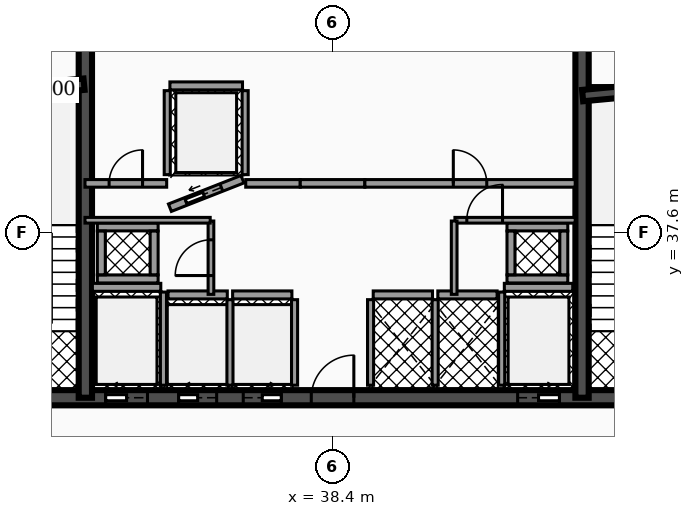
"""IFC4 building model, lengths in metres.
Left out: names, types, materials, properties, quantities, classifications, styles, units other than length and angle.
Written with IfcOpenShell. Run it as: python <this file> out.ifc"""

import sys

from ifc_helpers import new_model, si_unit, direction, frame, frame_2d, origin, place, context, subcontext, project, spatial, rectangle, extrude, element, fill, save


model = new_model("IFC4")
c1 = context("Model", 3, precision=1e-05, world=origin(), true_north=direction((0.0, 1.0)))
c2 = subcontext(c1, "Body", "Model", "MODEL_VIEW")
j1 = project(units=[si_unit("LENGTHUNIT", "METRE"), si_unit("PLANEANGLEUNIT", "RADIAN")], contexts=[c1])
p1 = place(None, origin())
s1 = spatial("IfcSite", under=j1, at=p1, CompositionType="ELEMENT")
p2 = place(p1, origin())
s2 = spatial("IfcBuilding", under=s1, at=p2, CompositionType="ELEMENT")
p3 = place(p2, frame((0.0, 0.0, 149.6)))
s3 = spatial("IfcBuildingStorey", under=s2, at=p3, CompositionType="ELEMENT", Elevation=149.6)
p4 = place(p3, frame((28.4, 33.25, 0.0), z_axis=(0.0, 0.0, 1.0), x_axis=(1.0, 0.0, 0.0)))
e1 = element("IfcWall", 1, at=p4, inside=s3, PredefinedType="SHEAR", context=c2, shape_type="SweptSolid", body=[
    extrude(rectangle(XDim=20.06, YDim=0.4, at=frame_2d((10.03, 0.0))), origin(), (0.0, 0.0, 1.0), 3.5),
])
p5 = place(p4, frame((4.03, 0.0, 0.0)))
e2 = element("IfcOpeningElement", 2, at=p5, cuts=e1, PredefinedType="OPENING", context=c2, shape_type="SweptSolid", body=[
    extrude(rectangle(XDim=1.1, YDim=2.15, at=frame_2d((0.55, 1.075))), frame((0.0, 0.21, 0.0), z_axis=(0.0, -1.0, 0.0), x_axis=(1.0, 0.0, 0.0)), (0.0, 0.0, 1.0), 0.42),
])
p6 = place(p4, frame((14.87, 0.0, 0.0)))
e3 = element("IfcOpeningElement", 3, at=p6, cuts=e1, PredefinedType="OPENING", context=c2, shape_type="SweptSolid", body=[
    extrude(rectangle(XDim=1.1, YDim=2.15, at=frame_2d((0.55, 1.075))), frame((0.0, 0.21, 0.0), z_axis=(0.0, -1.0, 0.0), x_axis=(1.0, 0.0, 0.0)), (0.0, 0.0, 1.0), 0.42),
])
p7 = place(p4, frame((5.95, 0.0, 0.0)))
e4 = element("IfcOpeningElement", 4, at=p7, cuts=e1, PredefinedType="OPENING", context=c2, shape_type="SweptSolid", body=[
    extrude(rectangle(XDim=1.0, YDim=2.1, at=frame_2d((0.5, 1.05))), frame((0.0, 0.21, 0.0), z_axis=(0.0, -1.0, 0.0), x_axis=(1.0, 0.0, 0.0)), (0.0, 0.0, 1.0), 0.42),
])
p8 = place(p4, frame((7.65, 0.0, 0.0)))
e5 = element("IfcOpeningElement", 5, at=p8, cuts=e1, PredefinedType="OPENING", context=c2, shape_type="SweptSolid", body=[
    extrude(rectangle(XDim=1.0, YDim=2.1, at=frame_2d((0.5, 1.05))), frame((0.0, 0.21, 0.0), z_axis=(0.0, -1.0, 0.0), x_axis=(1.0, 0.0, 0.0)), (0.0, 0.0, 1.0), 0.42),
])
p9 = place(p4, frame((1.31, 0.0, 0.0)))
e6 = element("IfcOpeningElement", 6, at=p9, cuts=e1, PredefinedType="OPENING", context=c2, shape_type="SweptSolid", body=[
    extrude(rectangle(XDim=1.1, YDim=2.2, at=frame_2d((0.55, 1.1))), frame((0.0, 0.21, 0.0), z_axis=(0.0, -1.0, 0.0), x_axis=(1.0, 0.0, 0.0)), (0.0, 0.0, 1.0), 0.42),
])
p10 = place(p4, frame((9.44, 0.0, 0.0)))
e7 = element("IfcOpeningElement", 7, at=p10, cuts=e1, PredefinedType="OPENING", context=c2, shape_type="SweptSolid", body=[
    extrude(rectangle(XDim=1.12, YDim=2.05, at=frame_2d((0.56, 1.025))), frame((0.0, 0.21, 0.0), z_axis=(0.0, -1.0, 0.0), x_axis=(1.0, 0.0, 0.0)), (0.0, 0.0, 1.0), 0.42),
])
p11 = place(p4, frame((17.65, 0.0, 0.0)))
e8 = element("IfcOpeningElement", 8, at=p11, cuts=e1, PredefinedType="OPENING", context=c2, shape_type="SweptSolid", body=[
    extrude(rectangle(XDim=1.1, YDim=2.2, at=frame_2d((0.55, 1.1))), frame((0.0, 0.21, 0.0), z_axis=(0.0, -1.0, 0.0), x_axis=(1.0, 0.0, 0.0)), (0.0, 0.0, 1.0), 0.42),
])
for number, where, z_axis, x_axis in (
    (9, (31.895, 33.25, 0.0), (0.0, 0.0, 1.0), (0.0, 1.0, 0.0)),
    (10, (44.965, 33.25, 0.0), (0.0, 0.0, 1.0), (0.0, 1.0, 0.0)),
):
    element("IfcWall", number, at=place(p3, frame(where, z_axis=z_axis, x_axis=x_axis)), inside=s3, PredefinedType="SHEAR", context=c2, shape_type="SweptSolid", body=[
        extrude(rectangle(XDim=10.2, YDim=0.35, at=frame_2d((5.1, 0.0))), origin(), (0.0, 0.0, 1.0), 3.5),
    ])
p12 = place(p3, frame((28.64, 41.2, 0.0), z_axis=(0.0, 0.0, 1.0), x_axis=(0.995687118776, 0.092774789157, 0.0)))
e11 = element("IfcWall", 11, at=p12, inside=s3, PredefinedType="SHEAR", context=c2, shape_type="SweptSolid", body=[
    extrude(rectangle(XDim=3.234, YDim=0.3, at=frame_2d((1.617, 0.0))), origin(), (0.0, 0.0, 1.0), 3.5),
])
p13 = place(p3, frame((44.98, 41.2, 0.0), z_axis=(0.0, 0.0, 1.0), x_axis=(0.995686468965, 0.09278176286, 0.0)))
e12 = element("IfcWall", 12, at=p13, inside=s3, PredefinedType="SHEAR", context=c2, shape_type="SweptSolid", body=[
    extrude(rectangle(XDim=3.234, YDim=0.3, at=frame_2d((1.617, 0.0))), origin(), (0.0, 0.0, 1.0), 3.5),
])
p14 = place(p3, frame((32.08, 36.155, 0.0), z_axis=(0.0, 0.0, 1.0), x_axis=(1.0, 0.0, 0.0)))
e13 = element("IfcWall", 13, at=p14, inside=s3, PredefinedType="SOLIDWALL", context=c2, shape_type="SweptSolid", body=[
    extrude(rectangle(XDim=1.8, YDim=0.21, at=frame_2d((0.9, 0.0))), origin(), (0.0, 0.0, 1.0), 2.472),
])
p15 = place(p3, frame((33.95, 33.58, 0.0), z_axis=(0.0, 0.0, 1.0), x_axis=(0.0, 1.0, 0.0)))
e14 = element("IfcWall", 14, at=p15, inside=s3, PredefinedType="SOLIDWALL", context=c2, shape_type="SweptSolid", body=[
    extrude(rectangle(XDim=2.45, YDim=0.16, at=frame_2d((1.225, 0.0))), origin(), (0.0, 0.0, 1.0), 2.472),
])
p16 = place(p3, frame((42.92, 36.155, 0.0), z_axis=(0.0, 0.0, 1.0), x_axis=(1.0, 0.0, 0.0)))
e15 = element("IfcWall", 15, at=p16, inside=s3, PredefinedType="SOLIDWALL", context=c2, shape_type="SweptSolid", body=[
    extrude(rectangle(XDim=1.8, YDim=0.21, at=frame_2d((0.9, 0.0))), origin(), (0.0, 0.0, 1.0), 2.472),
])
p17 = place(p3, frame((42.85, 33.58, 0.0), z_axis=(0.0, 0.0, 1.0), x_axis=(0.0, 1.0, 0.0)))
e16 = element("IfcWall", 16, at=p17, inside=s3, PredefinedType="SOLIDWALL", context=c2, shape_type="SweptSolid", body=[
    extrude(rectangle(XDim=2.45, YDim=0.16, at=frame_2d((1.225, 0.0))), origin(), (0.0, 0.0, 1.0), 2.472),
])
p18 = place(p3, frame((34.07, 35.955, 0.0), z_axis=(0.0, 0.0, 1.0), x_axis=(1.0, 0.0, 0.0)))
e17 = element("IfcWall", 17, at=p18, inside=s3, PredefinedType="SOLIDWALL", context=c2, shape_type="SweptSolid", body=[
    extrude(rectangle(XDim=1.56, YDim=0.21, at=frame_2d((0.78, 0.0))), origin(), (0.0, 0.0, 1.0), 2.472),
])
p19 = place(p3, frame((35.7, 33.58, 0.0), z_axis=(0.0, 0.0, 1.0), x_axis=(0.0, 1.0, 0.0)))
e18 = element("IfcWall", 18, at=p19, inside=s3, PredefinedType="SOLIDWALL", context=c2, shape_type="SweptSolid", body=[
    extrude(rectangle(XDim=2.25, YDim=0.16, at=frame_2d((1.125, 0.0))), origin(), (0.0, 0.0, 1.0), 2.472),
])
p20 = place(p3, frame((35.77, 35.955, 0.0), z_axis=(0.0, 0.0, 1.0), x_axis=(1.0, 0.0, 0.0)))
e19 = element("IfcWall", 19, at=p20, inside=s3, PredefinedType="SOLIDWALL", context=c2, shape_type="SweptSolid", body=[
    extrude(rectangle(XDim=1.56, YDim=0.21, at=frame_2d((0.78, 0.0))), origin(), (0.0, 0.0, 1.0), 2.472),
])
p21 = place(p3, frame((37.4, 33.58, 0.0), z_axis=(0.0, 0.0, 1.0), x_axis=(0.0, 1.0, 0.0)))
e20 = element("IfcWall", 20, at=p21, inside=s3, PredefinedType="SOLIDWALL", context=c2, shape_type="SweptSolid", body=[
    extrude(rectangle(XDim=2.25, YDim=0.16, at=frame_2d((1.125, 0.0))), origin(), (0.0, 0.0, 1.0), 2.472),
])
p22 = place(p3, frame((34.12, 38.25, 0.0), z_axis=(0.0, 0.0, 1.0), x_axis=(0.930804993012, 0.36551616241, 0.0)))
e21 = element("IfcWall", 21, at=p22, inside=s3, PredefinedType="SOLIDWALL", context=c2, shape_type="SweptSolid", body=[
    extrude(rectangle(XDim=2.052, YDim=0.21, at=frame_2d((1.026, 0.0))), origin(), (0.0, 0.0, 1.0), 2.472),
])
p23 = place(p22, frame((0.455, 0.0, 0.0)))
e22 = element("IfcOpeningElement", 22, at=p23, cuts=e21, PredefinedType="OPENING", context=c2, shape_type="SweptSolid", body=[
    extrude(rectangle(XDim=1.0, YDim=2.1, at=frame_2d((0.5, 1.05))), frame((0.0, 0.115, 0.0), z_axis=(0.0, -1.0, 0.0), x_axis=(1.0, 0.0, 0.0)), (0.0, 0.0, 1.0), 0.23),
])
p24 = place(p3, frame((34.12, 41.455, 0.0), z_axis=(0.0, 0.0, 1.0), x_axis=(1.0, 0.0, 0.0)))
e23 = element("IfcWall", 23, at=p24, inside=s3, PredefinedType="SOLIDWALL", context=c2, shape_type="SweptSolid", body=[
    extrude(rectangle(XDim=1.91, YDim=0.21, at=frame_2d((0.955, 0.0))), origin(), (0.0, 0.0, 1.0), 2.472),
])
for number, where, z_axis, x_axis in (
    (24, (34.05, 39.12, 0.0), (0.0, 0.0, 1.0), (0.0, 1.0, 0.0)),
    (25, (36.1, 39.12, 0.0), (0.0, 0.0, 1.0), (0.0, 1.0, 0.0)),
):
    element("IfcWall", number, at=place(p3, frame(where, z_axis=z_axis, x_axis=x_axis)), inside=s3, PredefinedType="SOLIDWALL", context=c2, shape_type="SweptSolid", body=[
        extrude(rectangle(XDim=2.21, YDim=0.16, at=frame_2d((1.105, 0.0))), origin(), (0.0, 0.0, 1.0), 2.472),
    ])
p25 = place(p3, frame((39.47, 35.955, 0.0), z_axis=(0.0, 0.0, 1.0), x_axis=(1.0, 0.0, 0.0)))
e26 = element("IfcWall", 26, at=p25, inside=s3, PredefinedType="SOLIDWALL", context=c2, shape_type="SweptSolid", body=[
    extrude(rectangle(XDim=1.56, YDim=0.21, at=frame_2d((0.78, 0.0))), origin(), (0.0, 0.0, 1.0), 2.472),
])
for number, where, z_axis, x_axis in (
    (27, (39.4, 33.58, 0.0), (0.0, 0.0, 1.0), (0.0, 1.0, 0.0)),
    (28, (41.1, 33.58, 0.0), (0.0, 0.0, 1.0), (0.0, 1.0, 0.0)),
):
    element("IfcWall", number, at=place(p3, frame(where, z_axis=z_axis, x_axis=x_axis)), inside=s3, PredefinedType="SOLIDWALL", context=c2, shape_type="SweptSolid", body=[
        extrude(rectangle(XDim=2.25, YDim=0.16, at=frame_2d((1.125, 0.0))), origin(), (0.0, 0.0, 1.0), 2.472),
    ])
p26 = place(p3, frame((41.17, 35.955, 0.0), z_axis=(0.0, 0.0, 1.0), x_axis=(1.0, 0.0, 0.0)))
e29 = element("IfcWall", 29, at=p26, inside=s3, PredefinedType="SOLIDWALL", context=c2, shape_type="SweptSolid", body=[
    extrude(rectangle(XDim=1.56, YDim=0.21, at=frame_2d((0.78, 0.0))), origin(), (0.0, 0.0, 1.0), 2.472),
])
for number, where, z_axis, x_axis in (
    (30, (32.21, 36.375, 0.0), (0.0, 0.0, 1.0), (1.0, 0.0, 0.0)),
    (31, (32.21, 37.745, 0.0), (0.0, 0.0, 1.0), (1.0, 0.0, 0.0)),
):
    element("IfcWall", number, at=place(p3, frame(where, z_axis=z_axis, x_axis=x_axis)), inside=s3, PredefinedType="SOLIDWALL", context=c2, shape_type="SweptSolid", body=[
        extrude(rectangle(XDim=1.6, YDim=0.21, at=frame_2d((0.8, 0.0))), origin(), (0.0, 0.0, 1.0), 3.5),
    ])
for number, where, z_axis, x_axis in (
    (32, (32.315, 36.485, 0.0), (0.0, 0.0, 1.0), (0.0, 1.0, 0.0)),
    (33, (33.705, 36.485, 0.0), (0.0, 0.0, 1.0), (0.0, 1.0, 0.0)),
):
    element("IfcWall", number, at=place(p3, frame(where, z_axis=z_axis, x_axis=x_axis)), inside=s3, PredefinedType="SOLIDWALL", context=c2, shape_type="SweptSolid", body=[
        extrude(rectangle(XDim=1.15, YDim=0.21, at=frame_2d((0.575, 0.0))), origin(), (0.0, 0.0, 1.0), 3.5),
    ])
for number, where, z_axis, x_axis in (
    (34, (42.99, 36.375, 0.0), (0.0, 0.0, 1.0), (1.0, 0.0, 0.0)),
    (35, (42.99, 37.745, 0.0), (0.0, 0.0, 1.0), (1.0, 0.0, 0.0)),
):
    element("IfcWall", number, at=place(p3, frame(where, z_axis=z_axis, x_axis=x_axis)), inside=s3, PredefinedType="SOLIDWALL", context=c2, shape_type="SweptSolid", body=[
        extrude(rectangle(XDim=1.6, YDim=0.21, at=frame_2d((0.8, 0.0))), origin(), (0.0, 0.0, 1.0), 3.5),
    ])
for number, where, z_axis, x_axis in (
    (36, (43.095, 36.485, 0.0), (0.0, 0.0, 1.0), (0.0, 1.0, 0.0)),
    (37, (44.485, 36.485, 0.0), (0.0, 0.0, 1.0), (0.0, 1.0, 0.0)),
):
    element("IfcWall", number, at=place(p3, frame(where, z_axis=z_axis, x_axis=x_axis)), inside=s3, PredefinedType="SOLIDWALL", context=c2, shape_type="SweptSolid", body=[
        extrude(rectangle(XDim=1.15, YDim=0.21, at=frame_2d((0.575, 0.0))), origin(), (0.0, 0.0, 1.0), 3.5),
    ])
p27 = place(p3, frame((35.2, 35.97, 0.0), z_axis=(0.0, 0.0, 1.0), x_axis=(0.0, 1.0, 0.0)))
e38 = element("IfcWall", 38, at=p27, inside=s3, PredefinedType="PARTITIONING", context=c2, shape_type="SweptSolid", body=[
    extrude(rectangle(XDim=1.93, YDim=0.15, at=frame_2d((0.965, 0.0))), origin(), (0.0, 0.0, 1.0), 2.457),
])
p28 = place(p27, frame((0.495, 0.0, 0.0)))
e39 = element("IfcOpeningElement", 39, at=p28, cuts=e38, PredefinedType="OPENING", context=c2, shape_type="SweptSolid", body=[
    extrude(rectangle(XDim=0.94, YDim=2.05, at=frame_2d((0.47, 1.025))), frame((0.0, 0.085, 0.0), z_axis=(0.0, -1.0, 0.0), x_axis=(1.0, 0.0, 0.0)), (0.0, 0.0, 1.0), 0.17),
])
p29 = place(p3, frame((31.885, 37.92, 0.0), z_axis=(0.0, 0.0, 1.0), x_axis=(1.0, 0.0, 0.0)))
e40 = element("IfcWall", 40, at=p29, inside=s3, PredefinedType="PARTITIONING", context=c2, shape_type="SweptSolid", body=[
    extrude(rectangle(XDim=3.295, YDim=0.15, at=frame_2d((1.647, 0.0))), origin(), (0.0, 0.0, 1.0), 2.457),
])
p30 = place(p3, frame((31.885, 38.89, 0.0), z_axis=(0.0, 0.0, 1.0), x_axis=(1.0, 0.0, 0.0)))
e41 = element("IfcWall", 41, at=p30, inside=s3, PredefinedType="PARTITIONING", context=c2, shape_type="SweptSolid", body=[
    extrude(rectangle(XDim=2.15, YDim=0.2, at=frame_2d((1.075, 0.0))), origin(), (0.0, 0.0, 1.0), 2.457),
])
p31 = place(p30, frame((0.635, 0.0, 0.0)))
e42 = element("IfcOpeningElement", 42, at=p31, cuts=e41, PredefinedType="OPENING", context=c2, shape_type="SweptSolid", body=[
    extrude(rectangle(XDim=0.88, YDim=2.05, at=frame_2d((0.44, 1.025))), frame((0.0, 0.11, 0.0), z_axis=(0.0, -1.0, 0.0), x_axis=(1.0, 0.0, 0.0)), (0.0, 0.0, 1.0), 0.22),
])
p32 = place(p3, frame((36.115, 38.89, 0.0), z_axis=(0.0, 0.0, 1.0), x_axis=(1.0, 0.0, 0.0)))
e43 = element("IfcWall", 43, at=p32, inside=s3, PredefinedType="PARTITIONING", context=c2, shape_type="SweptSolid", body=[
    extrude(rectangle(XDim=1.435, YDim=0.2, at=frame_2d((0.718, 0.0))), origin(), (0.0, 0.0, 1.0), 2.457),
])
p33 = place(p3, frame((37.55, 38.89, 0.0), z_axis=(0.0, 0.0, 1.0), x_axis=(1.0, 0.0, 0.0)))
e44 = element("IfcWall", 44, at=p33, inside=s3, PredefinedType="PARTITIONING", context=c2, shape_type="SweptSolid", body=[
    extrude(rectangle(XDim=1.7, YDim=0.2, at=frame_2d((0.85, 0.0))), origin(), (0.0, 0.0, 1.0), 2.457),
])
p34 = place(p3, frame((39.25, 38.89, 0.0), z_axis=(0.0, 0.0, 1.0), x_axis=(1.0, 0.0, 0.0)))
e45 = element("IfcWall", 45, at=p34, inside=s3, PredefinedType="PARTITIONING", context=c2, shape_type="SweptSolid", body=[
    extrude(rectangle(XDim=5.535, YDim=0.2, at=frame_2d((2.768, 0.0))), origin(), (0.0, 0.0, 1.0), 2.457),
])
p35 = place(p34, frame((2.327, 0.0, 0.0)))
e46 = element("IfcOpeningElement", 46, at=p35, cuts=e45, PredefinedType="OPENING", context=c2, shape_type="SweptSolid", body=[
    extrude(rectangle(XDim=0.88, YDim=2.05, at=frame_2d((0.44, 1.025))), frame((0.0, 0.11, 0.0), z_axis=(0.0, -1.0, 0.0), x_axis=(1.0, 0.0, 0.0)), (0.0, 0.0, 1.0), 0.22),
])
p36 = place(p3, frame((41.62, 37.92, 0.0), z_axis=(0.0, 0.0, 1.0), x_axis=(1.0, 0.0, 0.0)))
e47 = element("IfcWall", 47, at=p36, inside=s3, PredefinedType="PARTITIONING", context=c2, shape_type="SweptSolid", body=[
    extrude(rectangle(XDim=3.165, YDim=0.15, at=frame_2d((1.583, 0.0))), origin(), (0.0, 0.0, 1.0), 2.457),
])
p37 = place(p36, frame((0.312, 0.0, 0.0)))
e48 = element("IfcOpeningElement", 48, at=p37, cuts=e47, PredefinedType="OPENING", context=c2, shape_type="SweptSolid", body=[
    extrude(rectangle(XDim=0.94, YDim=2.05, at=frame_2d((0.47, 1.025))), frame((0.0, 0.085, 0.0), z_axis=(0.0, -1.0, 0.0), x_axis=(1.0, 0.0, 0.0)), (0.0, 0.0, 1.0), 0.17),
])
p38 = place(p3, frame((41.6, 35.97, 0.0), z_axis=(0.0, 0.0, 1.0), x_axis=(0.0, 1.0, 0.0)))
e49 = element("IfcWall", 49, at=p38, inside=s3, PredefinedType="PARTITIONING", context=c2, shape_type="SweptSolid", body=[
    extrude(rectangle(XDim=1.93, YDim=0.15, at=frame_2d((0.965, 0.0))), origin(), (0.0, 0.0, 1.0), 2.457),
])
p39 = place(p5, origin())
e50 = element("IfcDoor", 50, at=p39, inside=s3, OperationType="SLIDING_TO_LEFT", PredefinedType="DOOR", context=c2, shape_type="SweptSolid", body=[
    extrude(rectangle(XDim=1.1, YDim=2.15, at=frame_2d((0.55, 1.075))), frame((0.0, 0.025, 0.0), z_axis=(0.0, -1.0, 0.0), x_axis=(1.0, 0.0, 0.0)), (0.0, 0.0, 1.0), 0.05),
])
fill(e2, e50)
p40 = place(p6, origin())
e51 = element("IfcDoor", 51, at=p40, inside=s3, OperationType="SLIDING_TO_RIGHT", PredefinedType="DOOR", context=c2, shape_type="SweptSolid", body=[
    extrude(rectangle(XDim=1.1, YDim=2.15, at=frame_2d((0.55, 1.075))), frame((0.0, 0.025, 0.0), z_axis=(0.0, -1.0, 0.0), x_axis=(1.0, 0.0, 0.0)), (0.0, 0.0, 1.0), 0.05),
])
fill(e3, e51)
p41 = place(p7, origin())
e52 = element("IfcDoor", 52, at=p41, inside=s3, OperationType="SLIDING_TO_LEFT", PredefinedType="DOOR", context=c2, shape_type="SweptSolid", body=[
    extrude(rectangle(XDim=1.0, YDim=2.1, at=frame_2d((0.5, 1.05))), frame((0.0, 0.025, 0.0), z_axis=(0.0, -1.0, 0.0), x_axis=(1.0, 0.0, 0.0)), (0.0, 0.0, 1.0), 0.05),
])
fill(e4, e52)
p42 = place(p8, origin())
e53 = element("IfcDoor", 53, at=p42, inside=s3, OperationType="SLIDING_TO_RIGHT", PredefinedType="DOOR", context=c2, shape_type="SweptSolid", body=[
    extrude(rectangle(XDim=1.0, YDim=2.1, at=frame_2d((0.5, 1.05))), frame((0.0, 0.025, 0.0), z_axis=(0.0, -1.0, 0.0), x_axis=(1.0, 0.0, 0.0)), (0.0, 0.0, 1.0), 0.05),
])
fill(e5, e53)
p43 = place(p23, origin())
e54 = element("IfcDoor", 54, at=p43, inside=s3, OperationType="SLIDING_TO_LEFT", PredefinedType="DOOR", context=c2, shape_type="SweptSolid", body=[
    extrude(rectangle(XDim=1.0, YDim=2.1, at=frame_2d((0.5, 1.05))), frame((0.0, 0.025, 0.0), z_axis=(0.0, -1.0, 0.0), x_axis=(1.0, 0.0, 0.0)), (0.0, 0.0, 1.0), 0.05),
])
fill(e22, e54)
p44 = place(p10, origin())
e55 = element("IfcDoor", 55, at=p44, inside=s3, OperationType="SINGLE_SWING_RIGHT", PredefinedType="DOOR", context=c2, shape_type="SweptSolid", body=[
    extrude(rectangle(XDim=1.12, YDim=2.05, at=frame_2d((0.56, 1.025))), frame((0.0, 0.025, 0.0), z_axis=(0.0, -1.0, 0.0), x_axis=(1.0, 0.0, 0.0)), (0.0, 0.0, 1.0), 0.05),
])
fill(e7, e55)
p45 = place(p28, origin())
e56 = element("IfcDoor", 56, at=p45, inside=s3, OperationType="SINGLE_SWING_LEFT", PredefinedType="DOOR", context=c2, shape_type="SweptSolid", body=[
    extrude(rectangle(XDim=0.94, YDim=2.05, at=frame_2d((0.47, 1.025))), frame((0.0, 0.025, 0.0), z_axis=(0.0, -1.0, 0.0), x_axis=(1.0, 0.0, 0.0)), (0.0, 0.0, 1.0), 0.05),
])
fill(e39, e56)
p46 = place(p31, origin())
e57 = element("IfcDoor", 57, at=p46, inside=s3, OperationType="SINGLE_SWING_RIGHT", PredefinedType="DOOR", context=c2, shape_type="SweptSolid", body=[
    extrude(rectangle(XDim=0.88, YDim=2.05, at=frame_2d((0.44, 1.025))), frame((0.0, 0.025, 0.0), z_axis=(0.0, -1.0, 0.0), x_axis=(1.0, 0.0, 0.0)), (0.0, 0.0, 1.0), 0.05),
])
fill(e42, e57)
p47 = place(p35, origin())
e58 = element("IfcDoor", 58, at=p47, inside=s3, OperationType="SINGLE_SWING_LEFT", PredefinedType="DOOR", context=c2, shape_type="SweptSolid", body=[
    extrude(rectangle(XDim=0.88, YDim=2.05, at=frame_2d((0.44, 1.025))), frame((0.0, 0.025, 0.0), z_axis=(0.0, -1.0, 0.0), x_axis=(1.0, 0.0, 0.0)), (0.0, 0.0, 1.0), 0.05),
])
fill(e46, e58)
p48 = place(p37, origin())
e59 = element("IfcDoor", 59, at=p48, inside=s3, OperationType="SINGLE_SWING_RIGHT", PredefinedType="DOOR", context=c2, shape_type="SweptSolid", body=[
    extrude(rectangle(XDim=0.94, YDim=2.05, at=frame_2d((0.47, 1.025))), frame((0.0, 0.025, 0.0), z_axis=(0.0, -1.0, 0.0), x_axis=(1.0, 0.0, 0.0)), (0.0, 0.0, 1.0), 0.05),
])
fill(e48, e59)
save(model, sys.argv[1])
